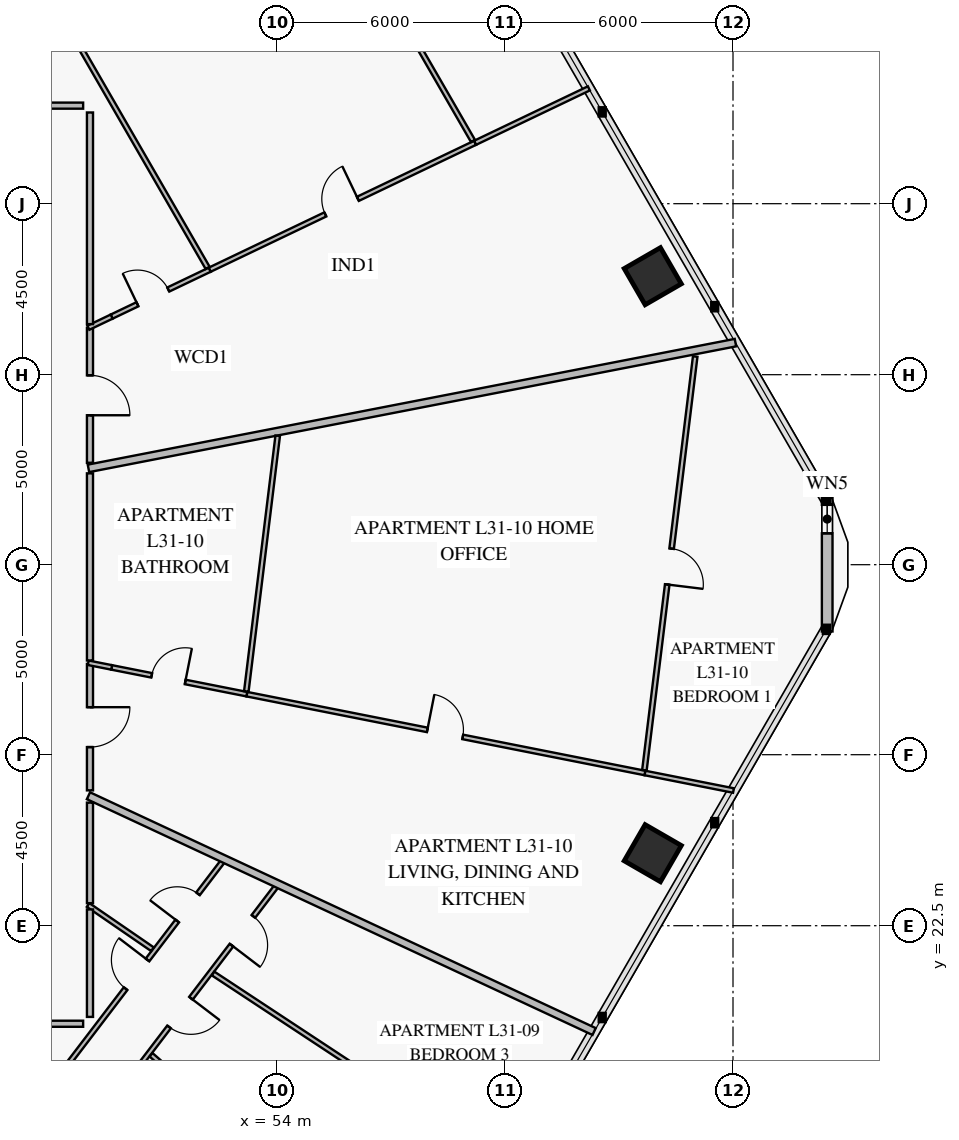
"""IFC4 building model, lengths in metres.
Left out: names, types, materials, properties, quantities, classifications, styles, units other than length and angle.
Written with IfcOpenShell. Run it as: python <this file> out.ifc"""

import sys

from ifc_helpers import new_model, si_unit, direction, frame, frame_2d, origin, origin_2d, place, context, subcontext, project, spatial, rectangle, extrude, element, fill, save


model = new_model("IFC4")
c1 = context("Model", 3, precision=1e-05, world=origin(), true_north=direction((0.0, 1.0)))
c2 = subcontext(c1, "Body", "Model", "MODEL_VIEW")
j1 = project(units=[si_unit("LENGTHUNIT", "METRE"), si_unit("PLANEANGLEUNIT", "RADIAN")], contexts=[c1])
p1 = place(None, origin())
s1 = spatial("IfcSite", under=j1, at=p1, CompositionType="ELEMENT")
p2 = place(p1, origin())
s2 = spatial("IfcBuilding", under=s1, at=p2, CompositionType="ELEMENT")
p3 = place(p2, frame((0.0, 0.0, 126.6)))
s3 = spatial("IfcBuildingStorey", under=s2, at=p3, CompositionType="ELEMENT", Elevation=126.6)
for number, where, z_axis, x_axis in (
    (1, (63.889, 39.592, 0.0), (0.0, 0.0, 1.0), (-0.5, 0.866, 0.0)),
    (2, (63.889, 24.408, 0.0), (0.0, 0.0, 1.0), (0.5, 0.866, 0.0)),
):
    element("IfcColumn", number, at=place(p3, frame(where, z_axis=z_axis, x_axis=x_axis)), inside=s3, PredefinedType="COLUMN", context=c2, shape_type="SweptSolid", body=[
        extrude(rectangle(XDim=1.1, YDim=1.1, at=origin_2d()), origin(), (0.0, 0.0, 1.0), 3.55),
    ])
p4 = place(p3, frame((68.479, 33.758, 0.0), z_axis=(0.0, 0.0, 1.0), x_axis=(0.0, -1.0, 0.0)))
e3 = element("IfcWall", 3, at=p4, inside=s3, PredefinedType="SOLIDWALL", context=c2, shape_type="SweptSolid", body=[
    extrude(rectangle(XDim=3.515, YDim=0.28, at=frame_2d((1.758, 0.0))), origin(), (0.0, 0.0, 1.0), 3.55),
])
p5 = place(p4, frame((0.182, 0.0, 0.85)))
e4 = element("IfcOpeningElement", 4, at=p5, cuts=e3, PredefinedType="OPENING", context=c2, shape_type="SweptSolid", body=[
    extrude(rectangle(XDim=0.75, YDim=1.5, at=frame_2d((0.375, 0.75))), frame((0.0, 0.152, 0.0), z_axis=(0.0, -1.0, 0.0), x_axis=(1.0, 0.0, 0.0)), (0.0, 0.0, 1.0), 0.304),
])
p6 = place(p3, frame((49.65, 38.528, 0.0), z_axis=(0.0, 0.0, 1.0), x_axis=(0.902135664901, 0.431452479555, 0.0)))
e5 = element("IfcWall", 5, at=p6, inside=s3, PredefinedType="PARTITIONING", context=c2, shape_type="SweptSolid", body=[
    extrude(rectangle(XDim=2.863, YDim=0.12, at=frame_2d((1.431, 0.0))), origin(), (0.0, 0.0, 1.0), 3.55),
])
p7 = place(p6, frame((0.752, 0.0, 0.0)))
e6 = element("IfcOpeningElement", 6, at=p7, cuts=e5, PredefinedType="OPENING", context=c2, shape_type="SweptSolid", body=[
    extrude(rectangle(XDim=0.9, YDim=2.1, at=frame_2d((0.45, 1.05))), frame((0.0, 0.072, 0.0), z_axis=(0.0, -1.0, 0.0), x_axis=(1.0, 0.0, 0.0)), (0.0, 0.0, 1.0), 0.144),
])
p8 = place(p3, frame((52.232, 39.763, 0.0), z_axis=(0.0, 0.0, 1.0), x_axis=(0.902143295933, 0.43143652326, 0.0)))
e7 = element("IfcWall", 7, at=p8, inside=s3, PredefinedType="PARTITIONING", context=c2, shape_type="SweptSolid", body=[
    extrude(rectangle(XDim=7.74, YDim=0.12, at=frame_2d((3.87, 0.0))), origin(), (0.0, 0.0, 1.0), 3.1),
])
p9 = place(p8, frame((3.37, 0.0, 0.0)))
e8 = element("IfcOpeningElement", 8, at=p9, cuts=e7, PredefinedType="OPENING", context=c2, shape_type="SweptSolid", body=[
    extrude(rectangle(XDim=0.95, YDim=2.1, at=frame_2d((0.475, 1.05))), frame((0.0, 0.072, 0.0), z_axis=(0.0, -1.0, 0.0), x_axis=(1.0, 0.0, 0.0)), (0.0, 0.0, 1.0), 0.144),
])
p10 = place(p3, frame((59.158, 43.151, 0.0), z_axis=(0.0, 0.0, 1.0), x_axis=(-0.500002146898, 0.866024164269, 0.0)))
e9 = element("IfcWall", 9, at=p10, inside=s3, PredefinedType="PARTITIONING", context=c2, shape_type="SweptSolid", body=[
    extrude(rectangle(XDim=10.604, YDim=0.12, at=frame_2d((5.302, 0.0))), origin(), (0.0, 0.0, 1.0), 2.85),
])
p11 = place(p10, frame((4.742, 0.0, 0.0)))
e10 = element("IfcOpeningElement", 10, at=p11, cuts=e9, PredefinedType="OPENING", context=c2, shape_type="SweptSolid", body=[
    extrude(rectangle(XDim=0.95, YDim=2.1, at=frame_2d((0.475, 1.05))), frame((0.0, 0.072, 0.0), z_axis=(0.0, -1.0, 0.0), x_axis=(1.0, 0.0, 0.0)), (0.0, 0.0, 1.0), 0.144),
])
p12 = place(p3, frame((49.08, 34.682, 0.0), z_axis=(0.0, 0.0, 1.0), x_axis=(0.0, 1.0, 0.0)))
e11 = element("IfcWall", 11, at=p12, inside=s3, PredefinedType="PARTITIONING", context=c2, shape_type="SweptSolid", body=[
    extrude(rectangle(XDim=3.552, YDim=0.16, at=frame_2d((1.776, 0.0))), origin(), (0.0, 0.0, 1.0), 2.85),
])
p13 = place(p12, frame((1.251, 0.0, 0.0)))
e12 = element("IfcOpeningElement", 12, at=p13, cuts=e11, PredefinedType="OPENING", context=c2, shape_type="SweptSolid", body=[
    extrude(rectangle(XDim=1.05, YDim=2.15, at=frame_2d((0.525, 1.075))), frame((0.0, 0.092, 0.0), z_axis=(0.0, -1.0, 0.0), x_axis=(1.0, 0.0, 0.0)), (0.0, 0.0, 1.0), 0.184),
])
p14 = place(p3, frame((47.901, 18.069, 0.0), z_axis=(0.0, 0.0, 1.0), x_axis=(0.606532258444, 0.795058877988, 0.0)))
e13 = element("IfcWall", 13, at=p14, inside=s3, PredefinedType="PARTITIONING", context=c2, shape_type="SweptSolid", body=[
    extrude(rectangle(XDim=7.714, YDim=0.12, at=frame_2d((3.857, 0.0))), origin(), (0.0, 0.0, 1.0), 2.85),
])
p15 = place(p14, frame((3.489, 0.0, 0.0)))
e14 = element("IfcOpeningElement", 14, at=p15, cuts=e13, PredefinedType="OPENING", context=c2, shape_type="SweptSolid", body=[
    extrude(rectangle(XDim=0.95, YDim=2.1, at=frame_2d((0.475, 1.05))), frame((0.0, 0.072, 0.0), z_axis=(0.0, -1.0, 0.0), x_axis=(1.0, 0.0, 0.0)), (0.0, 0.0, 1.0), 0.144),
])
p16 = place(p14, frame((5.729, 0.0, 0.0)))
e15 = element("IfcOpeningElement", 15, at=p16, cuts=e13, PredefinedType="OPENING", context=c2, shape_type="SweptSolid", body=[
    extrude(rectangle(XDim=0.9, YDim=2.1, at=frame_2d((0.45, 1.05))), frame((0.0, 0.072, 0.0), z_axis=(0.0, -1.0, 0.0), x_axis=(1.0, 0.0, 0.0)), (0.0, 0.0, 1.0), 0.144),
])
p17 = place(p3, frame((48.917, 16.894, 0.0), z_axis=(0.0, 0.0, 1.0), x_axis=(0.606532810855, 0.795058456566, 0.0)))
e16 = element("IfcWall", 16, at=p17, inside=s3, PredefinedType="PARTITIONING", context=c2, shape_type="SweptSolid", body=[
    extrude(rectangle(XDim=8.352, YDim=0.12, at=frame_2d((4.176, 0.0))), origin(), (0.0, 0.0, 1.0), 2.85),
])
p18 = place(p17, frame((0.993, 0.0, 0.0)))
e17 = element("IfcOpeningElement", 17, at=p18, cuts=e16, PredefinedType="OPENING", context=c2, shape_type="SweptSolid", body=[
    extrude(rectangle(XDim=0.95, YDim=2.1, at=frame_2d((0.475, 1.05))), frame((0.0, 0.072, 0.0), z_axis=(0.0, -1.0, 0.0), x_axis=(1.0, 0.0, 0.0)), (0.0, 0.0, 1.0), 0.144),
])
p19 = place(p17, frame((3.701, 0.0, 0.0)))
e18 = element("IfcOpeningElement", 18, at=p19, cuts=e16, PredefinedType="OPENING", context=c2, shape_type="SweptSolid", body=[
    extrude(rectangle(XDim=0.95, YDim=2.1, at=frame_2d((0.475, 1.05))), frame((0.0, 0.072, 0.0), z_axis=(0.0, -1.0, 0.0), x_axis=(1.0, 0.0, 0.0)), (0.0, 0.0, 1.0), 0.144),
])
p20 = place(p17, frame((6.409, 0.0, 0.0)))
e19 = element("IfcOpeningElement", 19, at=p20, cuts=e16, PredefinedType="OPENING", context=c2, shape_type="SweptSolid", body=[
    extrude(rectangle(XDim=0.95, YDim=2.1, at=frame_2d((0.475, 1.05))), frame((0.0, 0.072, 0.0), z_axis=(0.0, -1.0, 0.0), x_axis=(1.0, 0.0, 0.0)), (0.0, 0.0, 1.0), 0.144),
])
p21 = place(p3, frame((49.65, 29.297, 0.0), z_axis=(0.0, 0.0, 1.0), x_axis=(0.9809591767, -0.194214040813, 0.0)))
e20 = element("IfcWall", 20, at=p21, inside=s3, PredefinedType="PARTITIONING", context=c2, shape_type="SweptSolid", body=[
    extrude(rectangle(XDim=3.629, YDim=0.12, at=frame_2d((1.814, 0.0))), origin(), (0.0, 0.0, 1.0), 3.55),
])
p22 = place(p21, frame((1.074, 0.0, 0.0)))
e21 = element("IfcOpeningElement", 21, at=p22, cuts=e20, PredefinedType="OPENING", context=c2, shape_type="SweptSolid", body=[
    extrude(rectangle(XDim=0.9, YDim=2.1, at=frame_2d((0.45, 1.05))), frame((0.0, 0.072, 0.0), z_axis=(0.0, -1.0, 0.0), x_axis=(1.0, 0.0, 0.0)), (0.0, 0.0, 1.0), 0.144),
])
p23 = place(p3, frame((53.21, 28.592, 0.0), z_axis=(0.0, 0.0, 1.0), x_axis=(0.980957842049, -0.1942207819, 0.0)))
e22 = element("IfcWall", 22, at=p23, inside=s3, PredefinedType="PARTITIONING", context=c2, shape_type="SweptSolid", body=[
    extrude(rectangle(XDim=10.678, YDim=0.12, at=frame_2d((5.339, 0.0))), origin(), (0.0, 0.0, 1.0), 3.1),
])
p24 = place(p23, frame((4.839, 0.0, 0.0)))
e23 = element("IfcOpeningElement", 23, at=p24, cuts=e22, PredefinedType="OPENING", context=c2, shape_type="SweptSolid", body=[
    extrude(rectangle(XDim=0.95, YDim=2.1, at=frame_2d((0.475, 1.05))), frame((0.0, 0.072, 0.0), z_axis=(0.0, -1.0, 0.0), x_axis=(1.0, 0.0, 0.0)), (0.0, 0.0, 1.0), 0.144),
])
p25 = place(p3, frame((63.669, 26.591, 0.0), z_axis=(0.0, 0.0, 1.0), x_axis=(0.121886685179, 0.992544022185, 0.0)))
e24 = element("IfcWall", 24, at=p25, inside=s3, PredefinedType="PARTITIONING", context=c2, shape_type="SweptSolid", body=[
    extrude(rectangle(XDim=10.969, YDim=0.12, at=frame_2d((5.484, 0.0))), origin(), (0.0, 0.0, 1.0), 2.8),
])
p26 = place(p25, frame((4.925, 0.0, 0.0)))
e25 = element("IfcOpeningElement", 25, at=p26, cuts=e24, PredefinedType="OPENING", context=c2, shape_type="SweptSolid", body=[
    extrude(rectangle(XDim=0.95, YDim=2.1, at=frame_2d((0.475, 1.05))), frame((0.0, 0.072, 0.0), z_axis=(0.0, -1.0, 0.0), x_axis=(1.0, 0.0, 0.0)), (0.0, 0.0, 1.0), 0.144),
])
p27 = place(p3, frame((49.08, 26.061, 0.0), z_axis=(0.0, 0.0, 1.0), x_axis=(0.0, 1.0, 0.0)))
e26 = element("IfcWall", 26, at=p27, inside=s3, PredefinedType="PARTITIONING", context=c2, shape_type="SweptSolid", body=[
    extrude(rectangle(XDim=3.329, YDim=0.16, at=frame_2d((1.664, 0.0))), origin(), (0.0, 0.0, 1.0), 2.85),
])
p28 = place(p27, frame((1.139, 0.0, 0.0)))
e27 = element("IfcOpeningElement", 27, at=p28, cuts=e26, PredefinedType="OPENING", context=c2, shape_type="SweptSolid", body=[
    extrude(rectangle(XDim=1.05, YDim=2.15, at=frame_2d((0.525, 1.075))), frame((0.0, 0.092, 0.0), z_axis=(0.0, -1.0, 0.0), x_axis=(1.0, 0.0, 0.0)), (0.0, 0.0, 1.0), 0.184),
])
p29 = place(p3, frame((49.04, 34.535, 0.0), z_axis=(0.0, 0.0, 1.0), x_axis=(0.981625938162, 0.190815401706, 0.0)))
e28 = element("IfcWall", 28, at=p29, inside=s3, PredefinedType="PARTITIONING", context=c2, shape_type="SweptSolid", body=[
    extrude(rectangle(XDim=17.343, YDim=0.2, at=frame_2d((8.671, 0.0))), origin(), (0.0, 0.0, 1.0), 2.8),
])
p30 = place(p3, frame((49.038, 38.235, 0.0), z_axis=(0.0, 0.0, 1.0), x_axis=(0.902061167318, 0.431608214028, 0.0)))
e29 = element("IfcWall", 29, at=p30, inside=s3, PredefinedType="PARTITIONING", context=c2, shape_type="SweptSolid", body=[
    extrude(rectangle(XDim=0.679, YDim=0.12, at=frame_2d((0.339, 0.0))), origin(), (0.0, 0.0, 1.0), 3.55),
])
p31 = place(p3, frame((59.215, 43.103, 0.0), z_axis=(0.0, 0.0, 1.0), x_axis=(0.902135467198, 0.431452892936, 0.0)))
e30 = element("IfcWall", 30, at=p31, inside=s3, PredefinedType="PARTITIONING", context=c2, shape_type="SweptSolid", body=[
    extrude(rectangle(XDim=3.317, YDim=0.12, at=frame_2d((1.659, 0.0))), origin(), (0.0, 0.0, 1.0), 2.8),
])
p32 = place(p3, frame((52.176, 39.812, 0.0), z_axis=(0.0, 0.0, 1.0), x_axis=(-0.499998637326, 0.866026190523, 0.0)))
e31 = element("IfcWall", 31, at=p32, inside=s3, PredefinedType="PARTITIONING", context=c2, shape_type="SweptSolid", body=[
    extrude(rectangle(XDim=7.422, YDim=0.12, at=frame_2d((3.711, 0.0))), origin(), (0.0, 0.0, 1.0), 2.85),
])
p33 = place(p3, frame((46.466, 44.04, 0.0), z_axis=(0.0, 0.0, 1.0), x_axis=(0.656061723069, 0.754707238287, 0.0)))
e32 = element("IfcWall", 32, at=p33, inside=s3, PredefinedType="PARTITIONING", context=c2, shape_type="SweptSolid", body=[
    extrude(rectangle(XDim=14.674, YDim=0.2, at=frame_2d((7.337, 0.0))), origin(), (0.0, 0.0, 1.0), 2.8),
])
p34 = place(p3, frame((42.135, 19.96, 0.0), z_axis=(0.0, 0.0, 1.0), x_axis=(0.453989534113, -0.891007016199, 0.0)))
e33 = element("IfcWall", 33, at=p34, inside=s3, PredefinedType="PARTITIONING", context=c2, shape_type="SweptSolid", body=[
    extrude(rectangle(XDim=18.988, YDim=0.2, at=frame_2d((9.494, 0.0))), origin(), (0.0, 0.0, 1.0), 2.8),
])
p35 = place(p3, frame((49.03, 23.045, 0.0), z_axis=(0.0, 0.0, 1.0), x_axis=(0.824090441083, -0.5664582464, 0.0)))
e34 = element("IfcWall", 34, at=p35, inside=s3, PredefinedType="PARTITIONING", context=c2, shape_type="SweptSolid", body=[
    extrude(rectangle(XDim=2.055, YDim=0.12, at=frame_2d((1.028, 0.0))), origin(), (0.0, 0.0, 1.0), 3.55),
])
p36 = place(p3, frame((50.687, 19.103, 0.0), z_axis=(0.0, 0.0, 1.0), x_axis=(0.75142693105, -0.659816313297, 0.0)))
e35 = element("IfcWall", 35, at=p36, inside=s3, PredefinedType="PARTITIONING", context=c2, shape_type="SweptSolid", body=[
    extrude(rectangle(XDim=9.994, YDim=0.12, at=frame_2d((4.997, 0.0))), origin(), (0.0, 0.0, 1.0), 2.8),
])
p37 = place(p3, frame((52.319, 21.242, 0.0), z_axis=(0.0, 0.0, 1.0), x_axis=(0.834917563822, -0.550375019075, 0.0)))
e36 = element("IfcWall", 36, at=p37, inside=s3, PredefinedType="PARTITIONING", context=c2, shape_type="SweptSolid", body=[
    extrude(rectangle(XDim=9.473, YDim=0.12, at=frame_2d((4.737, 0.0))), origin(), (0.0, 0.0, 1.0), 2.8),
])
p38 = place(p3, frame((49.04, 25.919, 0.0), z_axis=(0.0, 0.0, 1.0), x_axis=(0.90630970467, -0.422614149338, 0.0)))
e37 = element("IfcWall", 37, at=p38, inside=s3, PredefinedType="PARTITIONING", context=c2, shape_type="SweptSolid", body=[
    extrude(rectangle(XDim=14.681, YDim=0.2, at=frame_2d((7.34, 0.0))), origin(), (0.0, 0.0, 1.0), 2.8),
])
p39 = place(p3, frame((49.035, 29.419, 0.0), z_axis=(0.0, 0.0, 1.0), x_axis=(0.980938489324, -0.194318501855, 0.0)))
e38 = element("IfcWall", 38, at=p39, inside=s3, PredefinedType="PARTITIONING", context=c2, shape_type="SweptSolid", body=[
    extrude(rectangle(XDim=0.627, YDim=0.12, at=frame_2d((0.313, 0.0))), origin(), (0.0, 0.0, 1.0), 3.55),
])
p40 = place(p3, frame((63.685, 26.518, 0.0), z_axis=(0.0, 0.0, 1.0), x_axis=(0.980958660601, -0.194216647569, 0.0)))
e39 = element("IfcWall", 39, at=p40, inside=s3, PredefinedType="PARTITIONING", context=c2, shape_type="SweptSolid", body=[
    extrude(rectangle(XDim=2.373, YDim=0.12, at=frame_2d((1.187, 0.0))), origin(), (0.0, 0.0, 1.0), 2.8),
])
p41 = place(p3, frame((53.194, 28.665, 0.0), z_axis=(0.0, 0.0, 1.0), x_axis=(0.121919936534, 0.992539938277, 0.0)))
e40 = element("IfcWall", 40, at=p41, inside=s3, PredefinedType="PARTITIONING", context=c2, shape_type="SweptSolid", body=[
    extrude(rectangle(XDim=6.778, YDim=0.12, at=frame_2d((3.389, 0.0))), origin(), (0.0, 0.0, 1.0), 3.55),
])
p42 = place(p3, frame((49.08, 38.331, 0.0), z_axis=(0.0, 0.0, 1.0), x_axis=(0.0, 1.0, 0.0)))
e41 = element("IfcWall", 41, at=p42, inside=s3, PredefinedType="PARTITIONING", context=c2, shape_type="SweptSolid", body=[
    extrude(rectangle(XDim=5.569, YDim=0.16, at=frame_2d((2.784, 0.0))), origin(), (0.0, 0.0, 1.0), 3.55),
])
p43 = place(p3, frame((48.9, 44.08, 0.0), z_axis=(0.0, 0.0, 1.0), x_axis=(-1.0, 0.0, 0.0)))
e42 = element("IfcWall", 42, at=p43, inside=s3, PredefinedType="PARTITIONING", context=c2, shape_type="SweptSolid", body=[
    extrude(rectangle(XDim=2.186, YDim=0.16, at=frame_2d((1.093, 0.0))), origin(), (0.0, 0.0, 1.0), 2.85),
])
p44 = place(p3, frame((49.08, 20.1, 0.0), z_axis=(0.0, 0.0, 1.0), x_axis=(0.0, 1.0, 0.0)))
e43 = element("IfcWall", 43, at=p44, inside=s3, PredefinedType="PARTITIONING", context=c2, shape_type="SweptSolid", body=[
    extrude(rectangle(XDim=2.828, YDim=0.16, at=frame_2d((1.414, 0.0))), origin(), (0.0, 0.0, 1.0), 3.55),
])
p45 = place(p3, frame((46.524, 19.92, 0.0), z_axis=(0.0, 0.0, 1.0), x_axis=(1.0, 0.0, 0.0)))
e44 = element("IfcWall", 44, at=p45, inside=s3, PredefinedType="PARTITIONING", context=c2, shape_type="SweptSolid", body=[
    extrude(rectangle(XDim=2.375, YDim=0.16, at=frame_2d((1.188, 0.0))), origin(), (0.0, 0.0, 1.0), 2.85),
])
p46 = place(p3, frame((49.08, 23.094, 0.0), z_axis=(0.0, 0.0, 1.0), x_axis=(0.0, 1.0, 0.0)))
e45 = element("IfcWall", 45, at=p46, inside=s3, PredefinedType="PARTITIONING", context=c2, shape_type="SweptSolid", body=[
    extrude(rectangle(XDim=2.646, YDim=0.16, at=frame_2d((1.323, 0.0))), origin(), (0.0, 0.0, 1.0), 3.55),
])
p47 = place(p3, frame((49.08, 29.479, 0.0), z_axis=(0.0, 0.0, 1.0), x_axis=(0.0, 1.0, 0.0)))
e46 = element("IfcWall", 46, at=p47, inside=s3, PredefinedType="PARTITIONING", context=c2, shape_type="SweptSolid", body=[
    extrude(rectangle(XDim=4.924, YDim=0.16, at=frame_2d((2.462, 0.0))), origin(), (0.0, 0.0, 1.0), 3.55),
])
p48 = place(p5, origin())
e47 = element("IfcWindow", 47, at=p48, inside=s3, PartitioningType="SINGLE_PANEL", PredefinedType="WINDOW", context=c2, shape_type="SweptSolid", body=[
    extrude(rectangle(XDim=0.75, YDim=1.5, at=frame_2d((0.375, 0.75))), frame((0.0, 0.03, 0.0), z_axis=(0.0, -1.0, 0.0), x_axis=(1.0, 0.0, 0.0)), (0.0, 0.0, 1.0), 0.06),
])
fill(e4, e47)
p49 = place(p7, origin())
e48 = element("IfcDoor", 48, at=p49, inside=s3, OperationType="SINGLE_SWING_LEFT", PredefinedType="DOOR", context=c2, shape_type="SweptSolid", body=[
    extrude(rectangle(XDim=0.9, YDim=2.1, at=frame_2d((0.45, 1.05))), frame((0.0, 0.025, 0.0), z_axis=(0.0, -1.0, 0.0), x_axis=(1.0, 0.0, 0.0)), (0.0, 0.0, 1.0), 0.05),
])
fill(e6, e48)
p50 = place(p9, origin())
e49 = element("IfcDoor", 49, at=p50, inside=s3, OperationType="SINGLE_SWING_RIGHT", PredefinedType="DOOR", context=c2, shape_type="SweptSolid", body=[
    extrude(rectangle(XDim=0.95, YDim=2.1, at=frame_2d((0.475, 1.05))), frame((0.0, 0.025, 0.0), z_axis=(0.0, -1.0, 0.0), x_axis=(1.0, 0.0, 0.0)), (0.0, 0.0, 1.0), 0.05),
])
fill(e8, e49)
p51 = place(p13, frame((1.05, 0.0, 0.0), z_axis=(0.0, 0.0, 1.0), x_axis=(-1.0, 0.0, 0.0)))
e50 = element("IfcDoor", 50, at=p51, inside=s3, OperationType="SINGLE_SWING_RIGHT", PredefinedType="DOOR", context=c2, shape_type="SweptSolid", body=[
    extrude(rectangle(XDim=1.05, YDim=2.15, at=frame_2d((0.525, 1.075))), frame((0.0, 0.025, 0.0), z_axis=(0.0, -1.0, 0.0), x_axis=(1.0, 0.0, 0.0)), (0.0, 0.0, 1.0), 0.05),
])
fill(e12, e50)
p52 = place(p15, origin())
e51 = element("IfcDoor", 51, at=p52, inside=s3, OperationType="SINGLE_SWING_RIGHT", PredefinedType="DOOR", context=c2, shape_type="SweptSolid", body=[
    extrude(rectangle(XDim=0.95, YDim=2.1, at=frame_2d((0.475, 1.05))), frame((0.0, 0.025, 0.0), z_axis=(0.0, -1.0, 0.0), x_axis=(1.0, 0.0, 0.0)), (0.0, 0.0, 1.0), 0.05),
])
fill(e14, e51)
p53 = place(p16, origin())
e52 = element("IfcDoor", 52, at=p53, inside=s3, OperationType="SINGLE_SWING_LEFT", PredefinedType="DOOR", context=c2, shape_type="SweptSolid", body=[
    extrude(rectangle(XDim=0.9, YDim=2.1, at=frame_2d((0.45, 1.05))), frame((0.0, 0.025, 0.0), z_axis=(0.0, -1.0, 0.0), x_axis=(1.0, 0.0, 0.0)), (0.0, 0.0, 1.0), 0.05),
])
fill(e15, e52)
p54 = place(p19, frame((0.95, 0.0, 0.0), z_axis=(0.0, 0.0, 1.0), x_axis=(-1.0, 0.0, 0.0)))
e53 = element("IfcDoor", 53, at=p54, inside=s3, OperationType="SINGLE_SWING_LEFT", PredefinedType="DOOR", context=c2, shape_type="SweptSolid", body=[
    extrude(rectangle(XDim=0.95, YDim=2.1, at=frame_2d((0.475, 1.05))), frame((0.0, 0.025, 0.0), z_axis=(0.0, -1.0, 0.0), x_axis=(1.0, 0.0, 0.0)), (0.0, 0.0, 1.0), 0.05),
])
fill(e18, e53)
p55 = place(p20, frame((0.95, 0.0, 0.0), z_axis=(0.0, 0.0, 1.0), x_axis=(-1.0, 0.0, 0.0)))
e54 = element("IfcDoor", 54, at=p55, inside=s3, OperationType="SINGLE_SWING_RIGHT", PredefinedType="DOOR", context=c2, shape_type="SweptSolid", body=[
    extrude(rectangle(XDim=0.95, YDim=2.1, at=frame_2d((0.475, 1.05))), frame((0.0, 0.025, 0.0), z_axis=(0.0, -1.0, 0.0), x_axis=(1.0, 0.0, 0.0)), (0.0, 0.0, 1.0), 0.05),
])
fill(e19, e54)
p56 = place(p22, origin())
e55 = element("IfcDoor", 55, at=p56, inside=s3, OperationType="SINGLE_SWING_RIGHT", PredefinedType="DOOR", context=c2, shape_type="SweptSolid", body=[
    extrude(rectangle(XDim=0.9, YDim=2.1, at=frame_2d((0.45, 1.05))), frame((0.0, 0.025, 0.0), z_axis=(0.0, -1.0, 0.0), x_axis=(1.0, 0.0, 0.0)), (0.0, 0.0, 1.0), 0.05),
])
fill(e21, e55)
p57 = place(p24, origin())
e56 = element("IfcDoor", 56, at=p57, inside=s3, OperationType="SINGLE_SWING_LEFT", PredefinedType="DOOR", context=c2, shape_type="SweptSolid", body=[
    extrude(rectangle(XDim=0.95, YDim=2.1, at=frame_2d((0.475, 1.05))), frame((0.0, 0.025, 0.0), z_axis=(0.0, -1.0, 0.0), x_axis=(1.0, 0.0, 0.0)), (0.0, 0.0, 1.0), 0.05),
])
fill(e23, e56)
p58 = place(p26, frame((0.95, 0.0, 0.0), z_axis=(0.0, 0.0, 1.0), x_axis=(-1.0, 0.0, 0.0)))
e57 = element("IfcDoor", 57, at=p58, inside=s3, OperationType="SINGLE_SWING_RIGHT", PredefinedType="DOOR", context=c2, shape_type="SweptSolid", body=[
    extrude(rectangle(XDim=0.95, YDim=2.1, at=frame_2d((0.475, 1.05))), frame((0.0, 0.025, 0.0), z_axis=(0.0, -1.0, 0.0), x_axis=(1.0, 0.0, 0.0)), (0.0, 0.0, 1.0), 0.05),
])
fill(e25, e57)
p59 = place(p28, frame((1.05, 0.0, 0.0), z_axis=(0.0, 0.0, 1.0), x_axis=(-1.0, 0.0, 0.0)))
e58 = element("IfcDoor", 58, at=p59, inside=s3, OperationType="SINGLE_SWING_LEFT", PredefinedType="DOOR", context=c2, shape_type="SweptSolid", body=[
    extrude(rectangle(XDim=1.05, YDim=2.15, at=frame_2d((0.525, 1.075))), frame((0.0, 0.025, 0.0), z_axis=(0.0, -1.0, 0.0), x_axis=(1.0, 0.0, 0.0)), (0.0, 0.0, 1.0), 0.05),
])
fill(e27, e58)
save(model, sys.argv[1])
